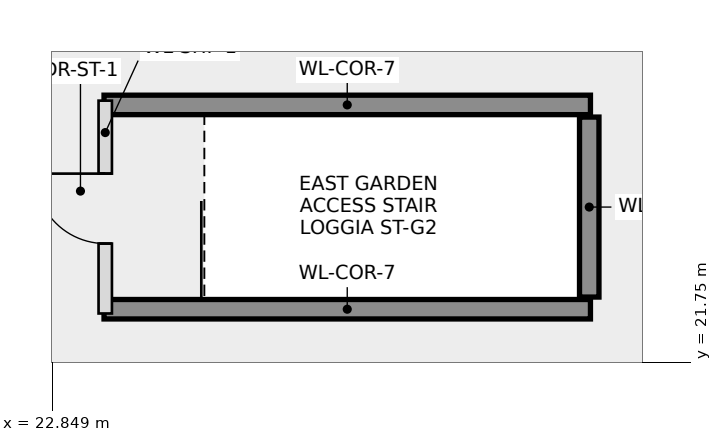
"""IFC4 building model, lengths in metres.
Left out: names, types, materials, properties, quantities, classifications, styles, units other than length and angle.
Written with IfcOpenShell. Run it as: python <this file> out.ifc"""

import sys

from ifc_helpers import new_model, si_unit, direction, frame, frame_2d, origin, place, context, subcontext, project, spatial, rectangle, extrude, element, fill, save


model = new_model("IFC4")
c1 = context("Model", 3, precision=1e-05, world=origin(), true_north=direction((0.0, 1.0)))
c2 = subcontext(c1, "Body", "Model", "MODEL_VIEW")
j1 = project(units=[si_unit("LENGTHUNIT", "METRE"), si_unit("PLANEANGLEUNIT", "RADIAN")], contexts=[c1])
p1 = place(None, origin())
s1 = spatial("IfcSite", under=j1, at=p1, CompositionType="ELEMENT")
p2 = place(p1, origin())
s2 = spatial("IfcBuilding", under=s1, at=p2, CompositionType="ELEMENT")
p3 = place(p2, frame((0.0, 0.0, 20.1)))
s3 = spatial("IfcBuildingStorey", under=s2, at=p3, CompositionType="ELEMENT", Elevation=20.1)
for number, where, z_axis, x_axis in (
    (1, (23.7, 25.98, 0.0), (0.0, 0.0, 1.0), (1.0, 0.0, 0.0)),
    (2, (23.7, 22.62, 0.0), (0.0, 0.0, 1.0), (1.0, 0.0, 0.0)),
):
    element("IfcWall", number, at=place(p3, frame(where, z_axis=z_axis, x_axis=x_axis)), inside=s3, PredefinedType="SHEAR", context=c2, shape_type="SweptSolid", body=[
        extrude(rectangle(XDim=8.0, YDim=0.32, at=frame_2d((4.0, 0.0))), origin(), (0.0, 0.0, 1.0), 3.52),
    ])
p4 = place(p3, frame((31.68, 22.82, 0.0), z_axis=(0.0, 0.0, 1.0), x_axis=(0.0, 1.0, 0.0)))
e3 = element("IfcWall", 3, at=p4, inside=s3, PredefinedType="SHEAR", context=c2, shape_type="SweptSolid", body=[
    extrude(rectangle(XDim=2.96, YDim=0.32, at=frame_2d((1.48, 0.0))), origin(), (0.0, 0.0, 1.0), 3.52),
])
p5 = place(p3, frame((23.72, 22.55, 0.0), z_axis=(0.0, 0.0, 1.0), x_axis=(0.0, 1.0, 0.0)))
e4 = element("IfcWall", 4, at=p5, inside=s3, PredefinedType="PLUMBINGWALL", context=c2, shape_type="SweptSolid", body=[
    extrude(rectangle(XDim=3.5, YDim=0.22, at=frame_2d((1.75, 0.0))), origin(), (0.0, 0.0, 1.0), 3.495),
])
p6 = place(p5, frame((1.15, 0.0, 0.0)))
e5 = element("IfcOpeningElement", 5, at=p6, cuts=e4, PredefinedType="OPENING", context=c2, shape_type="SweptSolid", body=[
    extrude(rectangle(XDim=1.15, YDim=2.15, at=frame_2d((0.575, 1.075))), frame((0.0, 0.12, 0.0), z_axis=(0.0, -1.0, 0.0), x_axis=(1.0, 0.0, 0.0)), (0.0, 0.0, 1.0), 0.24),
])
p7 = place(p6, origin())
e6 = element("IfcDoor", 6, at=p7, inside=s3, OperationType="SINGLE_SWING_RIGHT", PredefinedType="DOOR", context=c2, shape_type="SweptSolid", body=[
    extrude(rectangle(XDim=1.15, YDim=2.15, at=frame_2d((0.575, 1.075))), frame((0.0, 0.025, 0.0), z_axis=(0.0, -1.0, 0.0), x_axis=(1.0, 0.0, 0.0)), (0.0, 0.0, 1.0), 0.05),
])
fill(e5, e6)
save(model, sys.argv[1])
